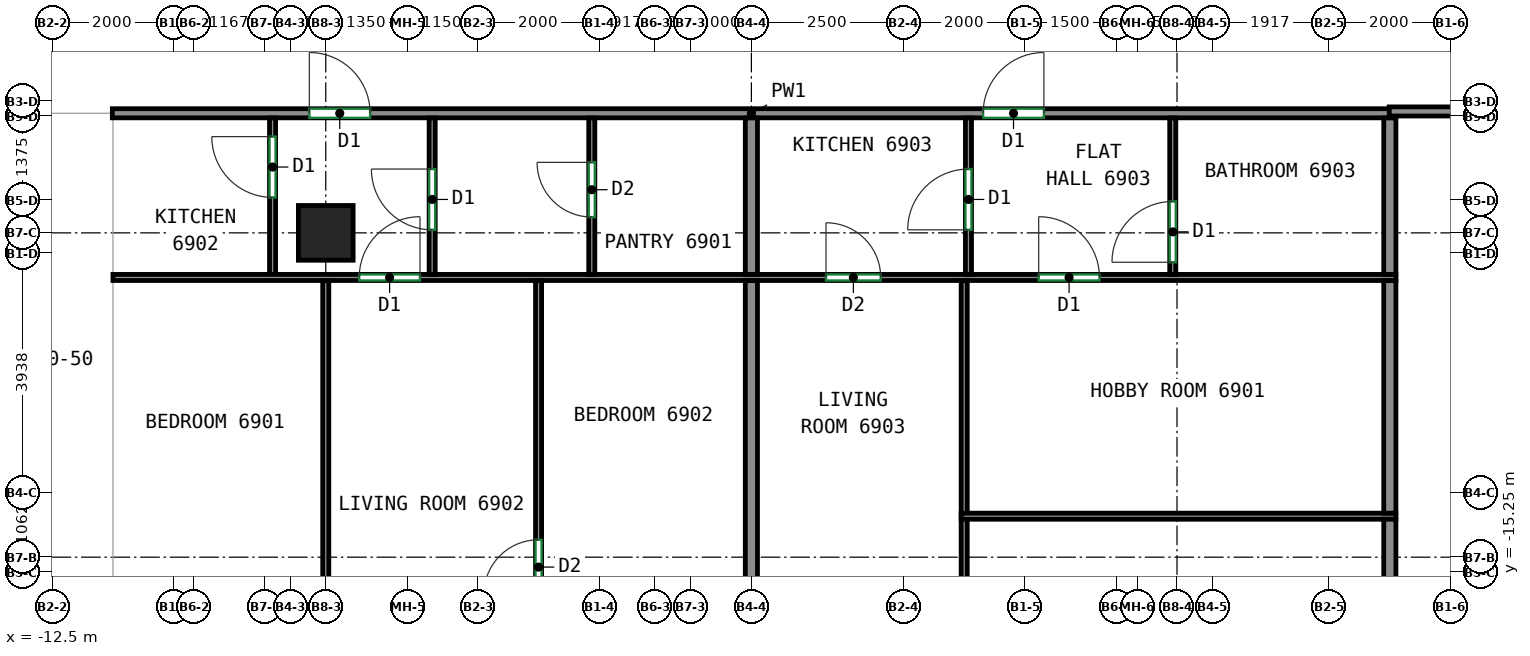
"""IFC4 building model, lengths in metres.
Left out: names, types, materials, properties, quantities, classifications, styles, units other than length and angle.
Written with IfcOpenShell. Run it as: python <this file> out.ifc"""

import sys

from ifc_helpers import new_model, si_unit, direction, frame, frame_2d, origin, origin_2d, place, context, subcontext, project, spatial, rectangle, extrude, source, transform, mapped, element, fill, save


model = new_model("IFC4")
c1 = context("Model", 3, precision=1e-05, world=origin(), true_north=direction((0.0, 1.0)))
c2 = subcontext(c1, "Body", "Model", "MODEL_VIEW")
j1 = project(units=[si_unit("LENGTHUNIT", "METRE"), si_unit("PLANEANGLEUNIT", "RADIAN")], contexts=[c1])
p1 = place(None, origin())
s1 = spatial("IfcSite", under=j1, at=p1, CompositionType="ELEMENT")
p2 = place(p1, origin())
s2 = spatial("IfcBuilding", under=s1, at=p2, CompositionType="ELEMENT")
p3 = place(p2, frame((0.0, 0.0, 280.6)))
s3 = spatial("IfcBuildingStorey", under=s2, at=p3, CompositionType="ELEMENT", Elevation=280.6)
m1 = source(origin(), c2, "Body", "SweptSolid", [
    extrude(rectangle(XDim=0.9, YDim=0.9, at=origin_2d()), origin(), (0.0, 0.0, 1.0), 3.12),
])
p4 = place(p3, frame((-8.0, -9.667, 0.0), z_axis=(0.0, 0.0, 1.0), x_axis=(1.0, 0.0, 0.0)))
e1 = element("IfcColumn", 1, at=p4, inside=s3, PredefinedType="COLUMN", context=c2, shape_type="MappedRepresentation", body=[
    mapped(m1, transform((0.0, 0.0, 0.0))),
])
p5 = place(p3, frame((-11.51, -7.7, 0.0), z_axis=(0.0, 0.0, 1.0), x_axis=(1.0, 0.0, 0.0)))
e2 = element("IfcWall", 2, at=p5, inside=s3, PredefinedType="PARTITIONING", context=c2, shape_type="SweptSolid", body=[
    extrude(rectangle(XDim=21.02, YDim=0.15, at=frame_2d((10.51, 0.0))), origin(), (0.0, 0.0, 1.0), 3.12),
])
p6 = place(p5, frame((3.24, 0.0, 0.0)))
e3 = element("IfcOpeningElement", 3, at=p6, cuts=e2, PredefinedType="OPENING", context=c2, shape_type="SweptSolid", body=[
    extrude(rectangle(XDim=1.0, YDim=2.1, at=frame_2d((0.5, 1.05))), frame((0.0, 0.085, 0.0), z_axis=(0.0, -1.0, 0.0), x_axis=(1.0, 0.0, 0.0)), (0.0, 0.0, 1.0), 0.17),
])
p7 = place(p5, frame((14.321, 0.0, 0.0)))
e4 = element("IfcOpeningElement", 4, at=p7, cuts=e2, PredefinedType="OPENING", context=c2, shape_type="SweptSolid", body=[
    extrude(rectangle(XDim=1.0, YDim=2.1, at=frame_2d((0.5, 1.05))), frame((0.0, 0.085, 0.0), z_axis=(0.0, -1.0, 0.0), x_axis=(1.0, 0.0, 0.0)), (0.0, 0.0, 1.0), 0.17),
])
p8 = place(p3, frame((9.49, -7.67, 0.0), z_axis=(0.0, 0.0, 1.0), x_axis=(1.0, 0.0, 0.0)))
e5 = element("IfcWall", 5, at=p8, inside=s3, PredefinedType="PARTITIONING", context=c2, shape_type="SweptSolid", body=[
    extrude(rectangle(XDim=9.61, YDim=0.15, at=frame_2d((4.805, 0.0))), origin(), (0.0, 0.0, 1.0), 3.12),
])
p9 = place(p8, frame((3.304, 0.0, 0.0)))
e6 = element("IfcOpeningElement", 6, at=p9, cuts=e5, PredefinedType="OPENING", context=c2, shape_type="SweptSolid", body=[
    extrude(rectangle(XDim=0.9, YDim=2.1, at=frame_2d((0.45, 1.05))), frame((0.0, 0.085, 0.0), z_axis=(0.0, -1.0, 0.0), x_axis=(1.0, 0.0, 0.0)), (0.0, 0.0, 1.0), 0.17),
])
p10 = place(p3, frame((-8.875, -10.35, 0.0), z_axis=(0.0, 0.0, 1.0), x_axis=(0.0, 1.0, 0.0)))
e7 = element("IfcWall", 7, at=p10, inside=s3, PredefinedType="PARTITIONING", context=c2, shape_type="SweptSolid", body=[
    extrude(rectangle(XDim=2.573, YDim=0.1, at=frame_2d((1.287, 0.0))), origin(), (0.0, 0.0, 1.0), 3.12),
])
p11 = place(p10, frame((1.266, 0.0, 0.0)))
e8 = element("IfcOpeningElement", 8, at=p11, cuts=e7, PredefinedType="OPENING", context=c2, shape_type="SweptSolid", body=[
    extrude(rectangle(XDim=1.0, YDim=2.1, at=frame_2d((0.5, 1.05))), frame((0.0, 0.06, 0.0), z_axis=(0.0, -1.0, 0.0), x_axis=(1.0, 0.0, 0.0)), (0.0, 0.0, 1.0), 0.12),
])
p12 = place(p3, frame((-11.5, -10.4, 0.0), z_axis=(0.0, 0.0, 1.0), x_axis=(1.0, 0.0, 0.0)))
e9 = element("IfcWall", 9, at=p12, inside=s3, PredefinedType="PARTITIONING", context=c2, shape_type="SweptSolid", body=[
    extrude(rectangle(XDim=21.1, YDim=0.1, at=frame_2d((10.55, 0.0))), origin(), (0.0, 0.0, 1.0), 3.12),
])
p13 = place(p12, frame((4.05, 0.0, 0.0)))
e10 = element("IfcOpeningElement", 10, at=p13, cuts=e9, PredefinedType="OPENING", context=c2, shape_type="SweptSolid", body=[
    extrude(rectangle(XDim=1.0, YDim=2.1, at=frame_2d((0.5, 1.05))), frame((0.0, 0.06, 0.0), z_axis=(0.0, -1.0, 0.0), x_axis=(1.0, 0.0, 0.0)), (0.0, 0.0, 1.0), 0.12),
])
p14 = place(p12, frame((11.727, 0.0, 0.0)))
e11 = element("IfcOpeningElement", 11, at=p14, cuts=e9, PredefinedType="OPENING", context=c2, shape_type="SweptSolid", body=[
    extrude(rectangle(XDim=0.9, YDim=2.1, at=frame_2d((0.45, 1.05))), frame((0.0, 0.06, 0.0), z_axis=(0.0, -1.0, 0.0), x_axis=(1.0, 0.0, 0.0)), (0.0, 0.0, 1.0), 0.12),
])
p15 = place(p12, frame((15.225, 0.0, 0.0)))
e12 = element("IfcOpeningElement", 12, at=p15, cuts=e9, PredefinedType="OPENING", context=c2, shape_type="SweptSolid", body=[
    extrude(rectangle(XDim=1.0, YDim=2.1, at=frame_2d((0.5, 1.05))), frame((0.0, 0.06, 0.0), z_axis=(0.0, -1.0, 0.0), x_axis=(1.0, 0.0, 0.0)), (0.0, 0.0, 1.0), 0.12),
])
p16 = place(p3, frame((-6.25, -10.35, 0.0), z_axis=(0.0, 0.0, 1.0), x_axis=(0.0, 1.0, 0.0)))
e13 = element("IfcWall", 13, at=p16, inside=s3, PredefinedType="PARTITIONING", context=c2, shape_type="SweptSolid", body=[
    extrude(rectangle(XDim=2.573, YDim=0.1, at=frame_2d((1.287, 0.0))), origin(), (0.0, 0.0, 1.0), 3.12),
])
p17 = place(p16, frame((0.733, 0.0, 0.0)))
e14 = element("IfcOpeningElement", 14, at=p17, cuts=e13, PredefinedType="OPENING", context=c2, shape_type="SweptSolid", body=[
    extrude(rectangle(XDim=1.0, YDim=2.1, at=frame_2d((0.5, 1.05))), frame((0.0, 0.06, 0.0), z_axis=(0.0, -1.0, 0.0), x_axis=(1.0, 0.0, 0.0)), (0.0, 0.0, 1.0), 0.12),
])
p18 = place(p3, frame((-3.625, -10.35, 0.0), z_axis=(0.0, 0.0, 1.0), x_axis=(0.0, 1.0, 0.0)))
e15 = element("IfcWall", 15, at=p18, inside=s3, PredefinedType="PARTITIONING", context=c2, shape_type="SweptSolid", body=[
    extrude(rectangle(XDim=2.573, YDim=0.1, at=frame_2d((1.287, 0.0))), origin(), (0.0, 0.0, 1.0), 3.12),
])
p19 = place(p18, frame((0.943, 0.0, 0.0)))
e16 = element("IfcOpeningElement", 16, at=p19, cuts=e15, PredefinedType="OPENING", context=c2, shape_type="SweptSolid", body=[
    extrude(rectangle(XDim=0.9, YDim=2.1, at=frame_2d((0.45, 1.05))), frame((0.0, 0.06, 0.0), z_axis=(0.0, -1.0, 0.0), x_axis=(1.0, 0.0, 0.0)), (0.0, 0.0, 1.0), 0.12),
])
p20 = place(p3, frame((-1.0, -10.35, 0.0), z_axis=(0.0, 0.0, 1.0), x_axis=(0.0, 1.0, 0.0)))
e17 = element("IfcWall", 17, at=p20, inside=s3, PredefinedType="PARTITIONING", context=c2, shape_type="SweptSolid", body=[
    extrude(rectangle(XDim=2.573, YDim=0.2, at=frame_2d((1.287, 0.0))), origin(), (0.0, 0.0, 1.0), 3.12),
])
p21 = place(p3, frame((-8.0, -17.725, 0.0), z_axis=(0.0, 0.0, 1.0), x_axis=(0.0, 1.0, 0.0)))
e18 = element("IfcWall", 18, at=p21, inside=s3, PredefinedType="PARTITIONING", context=c2, shape_type="SweptSolid", body=[
    extrude(rectangle(XDim=7.273, YDim=0.1, at=frame_2d((3.637, 0.0))), origin(), (0.0, 0.0, 1.0), 3.12),
])
p22 = place(p21, frame((1.111, 0.0, 0.0)))
e19 = element("IfcOpeningElement", 19, at=p22, cuts=e18, PredefinedType="OPENING", context=c2, shape_type="SweptSolid", body=[
    extrude(rectangle(XDim=0.9, YDim=2.1, at=frame_2d((0.45, 1.05))), frame((0.0, 0.06, 0.0), z_axis=(0.0, -1.0, 0.0), x_axis=(1.0, 0.0, 0.0)), (0.0, 0.0, 1.0), 0.12),
])
p23 = place(p3, frame((-4.5, -18.25, 0.0), z_axis=(0.0, 0.0, 1.0), x_axis=(0.0, 1.0, 0.0)))
e20 = element("IfcWall", 20, at=p23, inside=s3, PredefinedType="PARTITIONING", context=c2, shape_type="SweptSolid", body=[
    extrude(rectangle(XDim=7.798, YDim=0.1, at=frame_2d((3.899, 0.0))), origin(), (0.0, 0.0, 1.0), 3.12),
])
p24 = place(p23, frame((2.637, 0.0, 0.0)))
e21 = element("IfcOpeningElement", 21, at=p24, cuts=e20, PredefinedType="OPENING", context=c2, shape_type="SweptSolid", body=[
    extrude(rectangle(XDim=0.9, YDim=2.1, at=frame_2d((0.45, 1.05))), frame((0.0, 0.06, 0.0), z_axis=(0.0, -1.0, 0.0), x_axis=(1.0, 0.0, 0.0)), (0.0, 0.0, 1.0), 0.12),
])
p25 = place(p3, frame((-1.0, -17.725, 0.0), z_axis=(0.0, 0.0, 1.0), x_axis=(0.0, 1.0, 0.0)))
e22 = element("IfcWall", 22, at=p25, inside=s3, PredefinedType="PARTITIONING", context=c2, shape_type="SweptSolid", body=[
    extrude(rectangle(XDim=7.273, YDim=0.2, at=frame_2d((3.637, 0.0))), origin(), (0.0, 0.0, 1.0), 3.12),
])
p26 = place(p3, frame((2.57, -10.35, 0.0), z_axis=(0.0, 0.0, 1.0), x_axis=(0.0, 1.0, 0.0)))
e23 = element("IfcWall", 23, at=p26, inside=s3, PredefinedType="PARTITIONING", context=c2, shape_type="SweptSolid", body=[
    extrude(rectangle(XDim=2.573, YDim=0.1, at=frame_2d((1.287, 0.0))), origin(), (0.0, 0.0, 1.0), 3.12),
])
p27 = place(p26, frame((0.733, 0.0, 0.0)))
e24 = element("IfcOpeningElement", 24, at=p27, cuts=e23, PredefinedType="OPENING", context=c2, shape_type="SweptSolid", body=[
    extrude(rectangle(XDim=1.0, YDim=2.1, at=frame_2d((0.5, 1.05))), frame((0.0, 0.06, 0.0), z_axis=(0.0, -1.0, 0.0), x_axis=(1.0, 0.0, 0.0)), (0.0, 0.0, 1.0), 0.12),
])
p28 = place(p3, frame((5.93, -10.35, 0.0), z_axis=(0.0, 0.0, 1.0), x_axis=(0.0, 1.0, 0.0)))
e25 = element("IfcWall", 25, at=p28, inside=s3, PredefinedType="PARTITIONING", context=c2, shape_type="SweptSolid", body=[
    extrude(rectangle(XDim=2.573, YDim=0.1, at=frame_2d((1.287, 0.0))), origin(), (0.0, 0.0, 1.0), 3.12),
])
p29 = place(p28, frame((0.2, 0.0, 0.0)))
e26 = element("IfcOpeningElement", 26, at=p29, cuts=e25, PredefinedType="OPENING", context=c2, shape_type="SweptSolid", body=[
    extrude(rectangle(XDim=1.0, YDim=2.1, at=frame_2d((0.5, 1.05))), frame((0.0, 0.06, 0.0), z_axis=(0.0, -1.0, 0.0), x_axis=(1.0, 0.0, 0.0)), (0.0, 0.0, 1.0), 0.12),
])
p30 = place(p3, frame((9.5, -10.35, 0.0), z_axis=(0.0, 0.0, 1.0), x_axis=(0.0, 1.0, 0.0)))
e27 = element("IfcWall", 27, at=p30, inside=s3, PredefinedType="PARTITIONING", context=c2, shape_type="SweptSolid", body=[
    extrude(rectangle(XDim=2.573, YDim=0.2, at=frame_2d((1.287, 0.0))), origin(), (0.0, 0.0, 1.0), 3.12),
])
p31 = place(p3, frame((2.5, -18.25, 0.0), z_axis=(0.0, 0.0, 1.0), x_axis=(0.0, 1.0, 0.0)))
e28 = element("IfcWall", 28, at=p31, inside=s3, PredefinedType="PARTITIONING", context=c2, shape_type="SweptSolid", body=[
    extrude(rectangle(XDim=3.884, YDim=0.1, at=frame_2d((1.942, 0.0))), origin(), (0.0, 0.0, 1.0), 3.12),
])
p32 = place(p31, frame((1.337, 0.0, 0.0)))
e29 = element("IfcOpeningElement", 29, at=p32, cuts=e28, PredefinedType="OPENING", context=c2, shape_type="SweptSolid", body=[
    extrude(rectangle(XDim=0.9, YDim=2.1, at=frame_2d((0.45, 1.05))), frame((0.0, 0.06, 0.0), z_axis=(0.0, -1.0, 0.0), x_axis=(1.0, 0.0, 0.0)), (0.0, 0.0, 1.0), 0.12),
])
p33 = place(p3, frame((2.5, -14.286, 0.0), z_axis=(0.0, 0.0, 1.0), x_axis=(0.0, 1.0, 0.0)))
e30 = element("IfcWall", 30, at=p33, inside=s3, PredefinedType="PARTITIONING", context=c2, shape_type="SweptSolid", body=[
    extrude(rectangle(XDim=3.834, YDim=0.1, at=frame_2d((1.917, 0.0))), origin(), (0.0, 0.0, 1.0), 3.12),
])
p34 = place(p3, frame((9.6, -14.326, 0.0), z_axis=(0.0, 0.0, 1.0), x_axis=(-1.0, 0.0, 0.0)))
e31 = element("IfcWall", 31, at=p34, inside=s3, PredefinedType="PARTITIONING", context=c2, shape_type="SweptSolid", body=[
    extrude(rectangle(XDim=7.15, YDim=0.1, at=frame_2d((3.575, 0.0))), origin(), (0.0, 0.0, 1.0), 3.12),
])
p35 = place(p3, frame((9.5, -18.25, 0.0), z_axis=(0.0, 0.0, 1.0), x_axis=(0.0, 1.0, 0.0)))
e32 = element("IfcWall", 32, at=p35, inside=s3, PredefinedType="PARTITIONING", context=c2, shape_type="SweptSolid", body=[
    extrude(rectangle(XDim=3.874, YDim=0.2, at=frame_2d((1.937, 0.0))), origin(), (0.0, 0.0, 1.0), 3.12),
])
p36 = place(p3, frame((9.5, -14.276, 0.0), z_axis=(0.0, 0.0, 1.0), x_axis=(0.0, 1.0, 0.0)))
e33 = element("IfcWall", 33, at=p36, inside=s3, PredefinedType="PARTITIONING", context=c2, shape_type="SweptSolid", body=[
    extrude(rectangle(XDim=3.824, YDim=0.2, at=frame_2d((1.912, 0.0))), origin(), (0.0, 0.0, 1.0), 3.12),
])
p37 = place(p24, origin())
e34 = element("IfcDoor", 34, at=p37, inside=s3, OperationType="SINGLE_SWING_LEFT", PredefinedType="DOOR", context=c2, shape_type="SweptSolid", body=[
    extrude(rectangle(XDim=0.9, YDim=2.1, at=frame_2d((0.45, 1.05))), frame((0.0, 0.025, 0.0), z_axis=(0.0, -1.0, 0.0), x_axis=(1.0, 0.0, 0.0)), (0.0, 0.0, 1.0), 0.05),
])
fill(e21, e34)
p38 = place(p13, origin())
e35 = element("IfcDoor", 35, at=p38, inside=s3, OperationType="SINGLE_SWING_RIGHT", PredefinedType="DOOR", context=c2, shape_type="SweptSolid", body=[
    extrude(rectangle(XDim=1.0, YDim=2.1, at=frame_2d((0.5, 1.05))), frame((0.0, 0.025, 0.0), z_axis=(0.0, -1.0, 0.0), x_axis=(1.0, 0.0, 0.0)), (0.0, 0.0, 1.0), 0.05),
])
fill(e10, e35)
p39 = place(p14, origin())
e36 = element("IfcDoor", 36, at=p39, inside=s3, OperationType="SINGLE_SWING_LEFT", PredefinedType="DOOR", context=c2, shape_type="SweptSolid", body=[
    extrude(rectangle(XDim=0.9, YDim=2.1, at=frame_2d((0.45, 1.05))), frame((0.0, 0.025, 0.0), z_axis=(0.0, -1.0, 0.0), x_axis=(1.0, 0.0, 0.0)), (0.0, 0.0, 1.0), 0.05),
])
fill(e11, e36)
p40 = place(p15, origin())
e37 = element("IfcDoor", 37, at=p40, inside=s3, OperationType="SINGLE_SWING_LEFT", PredefinedType="DOOR", context=c2, shape_type="SweptSolid", body=[
    extrude(rectangle(XDim=1.0, YDim=2.1, at=frame_2d((0.5, 1.05))), frame((0.0, 0.025, 0.0), z_axis=(0.0, -1.0, 0.0), x_axis=(1.0, 0.0, 0.0)), (0.0, 0.0, 1.0), 0.05),
])
fill(e12, e37)
p41 = place(p29, origin())
e38 = element("IfcDoor", 38, at=p41, inside=s3, OperationType="SINGLE_SWING_LEFT", PredefinedType="DOOR", context=c2, shape_type="SweptSolid", body=[
    extrude(rectangle(XDim=1.0, YDim=2.1, at=frame_2d((0.5, 1.05))), frame((0.0, 0.025, 0.0), z_axis=(0.0, -1.0, 0.0), x_axis=(1.0, 0.0, 0.0)), (0.0, 0.0, 1.0), 0.05),
])
fill(e26, e38)
p42 = place(p17, origin())
e39 = element("IfcDoor", 39, at=p42, inside=s3, OperationType="SINGLE_SWING_RIGHT", PredefinedType="DOOR", context=c2, shape_type="SweptSolid", body=[
    extrude(rectangle(XDim=1.0, YDim=2.1, at=frame_2d((0.5, 1.05))), frame((0.0, 0.025, 0.0), z_axis=(0.0, -1.0, 0.0), x_axis=(1.0, 0.0, 0.0)), (0.0, 0.0, 1.0), 0.05),
])
fill(e14, e39)
p43 = place(p27, origin())
e40 = element("IfcDoor", 40, at=p43, inside=s3, OperationType="SINGLE_SWING_LEFT", PredefinedType="DOOR", context=c2, shape_type="SweptSolid", body=[
    extrude(rectangle(XDim=1.0, YDim=2.1, at=frame_2d((0.5, 1.05))), frame((0.0, 0.025, 0.0), z_axis=(0.0, -1.0, 0.0), x_axis=(1.0, 0.0, 0.0)), (0.0, 0.0, 1.0), 0.05),
])
fill(e24, e40)
p44 = place(p19, origin())
e41 = element("IfcDoor", 41, at=p44, inside=s3, OperationType="SINGLE_SWING_RIGHT", PredefinedType="DOOR", context=c2, shape_type="SweptSolid", body=[
    extrude(rectangle(XDim=0.9, YDim=2.1, at=frame_2d((0.45, 1.05))), frame((0.0, 0.025, 0.0), z_axis=(0.0, -1.0, 0.0), x_axis=(1.0, 0.0, 0.0)), (0.0, 0.0, 1.0), 0.05),
])
fill(e16, e41)
p45 = place(p11, origin())
e42 = element("IfcDoor", 42, at=p45, inside=s3, OperationType="SINGLE_SWING_RIGHT", PredefinedType="DOOR", context=c2, shape_type="SweptSolid", body=[
    extrude(rectangle(XDim=1.0, YDim=2.1, at=frame_2d((0.5, 1.05))), frame((0.0, 0.025, 0.0), z_axis=(0.0, -1.0, 0.0), x_axis=(1.0, 0.0, 0.0)), (0.0, 0.0, 1.0), 0.05),
])
fill(e8, e42)
p46 = place(p6, origin())
e43 = element("IfcDoor", 43, at=p46, inside=s3, OperationType="SINGLE_SWING_LEFT", PredefinedType="DOOR", context=c2, shape_type="SweptSolid", body=[
    extrude(rectangle(XDim=1.0, YDim=2.1, at=frame_2d((0.5, 1.05))), frame((0.0, 0.025, 0.0), z_axis=(0.0, -1.0, 0.0), x_axis=(1.0, 0.0, 0.0)), (0.0, 0.0, 1.0), 0.05),
])
fill(e3, e43)
p47 = place(p7, origin())
e44 = element("IfcDoor", 44, at=p47, inside=s3, OperationType="SINGLE_SWING_RIGHT", PredefinedType="DOOR", context=c2, shape_type="SweptSolid", body=[
    extrude(rectangle(XDim=1.0, YDim=2.1, at=frame_2d((0.5, 1.05))), frame((0.0, 0.025, 0.0), z_axis=(0.0, -1.0, 0.0), x_axis=(1.0, 0.0, 0.0)), (0.0, 0.0, 1.0), 0.05),
])
fill(e4, e44)
save(model, sys.argv[1])
